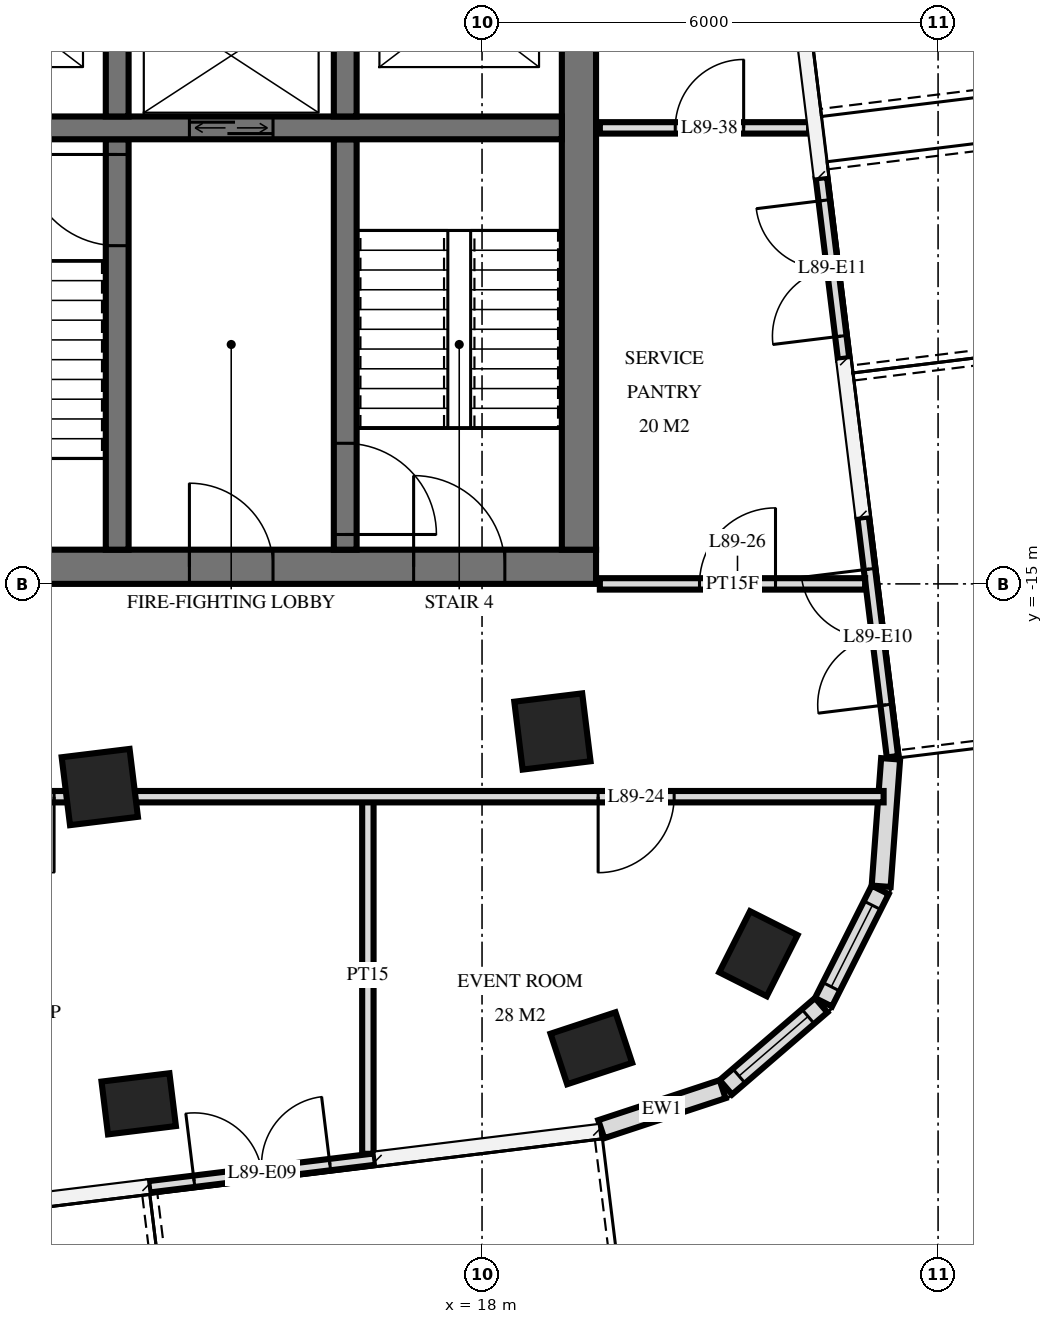
"""IFC4 building model, lengths in metres.
Left out: names, types, materials, properties, quantities, classifications, styles, units other than length and angle.
Written with IfcOpenShell. Run it as: python <this file> out.ifc"""

import sys

from ifc_helpers import new_model, si_unit, direction, frame, frame_2d, origin, origin_2d, place, context, subcontext, project, spatial, rectangle, extrude, element, fill, save


model = new_model("IFC4")
c1 = context("Model", 3, precision=1e-05, world=origin(), true_north=direction((0.0, 1.0)))
c2 = subcontext(c1, "Body", "Model", "MODEL_VIEW")
j1 = project(units=[si_unit("LENGTHUNIT", "METRE"), si_unit("PLANEANGLEUNIT", "RADIAN")], contexts=[c1])
p1 = place(None, origin())
s1 = spatial("IfcSite", under=j1, at=p1, CompositionType="ELEMENT")
p2 = place(p1, origin())
s2 = spatial("IfcBuilding", under=s1, at=p2, CompositionType="ELEMENT")
p3 = place(p2, frame((0.0, 0.0, 338.6)))
s3 = spatial("IfcBuildingStorey", under=s2, at=p3, CompositionType="ELEMENT", Elevation=338.6)
p4 = place(p3, frame((12.971, -17.673, 0.0), z_axis=(0.0, 0.0, 1.0), x_axis=(0.992546151641, 0.121869343405, 0.0)))
e1 = element("IfcColumn", 1, at=p4, inside=s3, PredefinedType="COLUMN", context=c2, shape_type="SweptSolid", body=[
    extrude(rectangle(XDim=0.9, YDim=0.9, at=origin_2d()), origin(), (0.0, 0.0, 1.0), 4.0),
])
p5 = place(p3, frame((13.483, -21.841, 0.0), z_axis=(0.0, 0.0, 1.0), x_axis=(0.992546151641, 0.121869343405, 0.0)))
e2 = element("IfcColumn", 2, at=p5, inside=s3, PredefinedType="COLUMN", context=c2, shape_type="SweptSolid", body=[
    extrude(rectangle(XDim=0.9, YDim=0.7, at=origin_2d()), origin(), (0.0, 0.0, 1.0), 4.0),
])
p6 = place(p3, frame((18.926, -16.942, 0.0), z_axis=(0.0, 0.0, 1.0), x_axis=(0.992546151641, 0.121869343405, 0.0)))
e3 = element("IfcColumn", 3, at=p6, inside=s3, PredefinedType="COLUMN", context=c2, shape_type="SweptSolid", body=[
    extrude(rectangle(XDim=0.9, YDim=0.9, at=origin_2d()), origin(), (0.0, 0.0, 1.0), 4.0),
])
for number, where, z_axis, x_axis in (
    (4, (19.438, -21.11, 0.0), (0.0, 0.0, 1.0), (0.95, 0.313, 0.0)),
    (5, (21.636, -19.866, 0.0), (0.0, 0.0, 1.0), (0.45, 0.893, 0.0)),
):
    element("IfcColumn", number, at=place(p3, frame(where, z_axis=z_axis, x_axis=x_axis)), inside=s3, PredefinedType="COLUMN", context=c2, shape_type="SweptSolid", body=[
        extrude(rectangle(XDim=0.9, YDim=0.7, at=origin_2d()), origin(), (0.0, 0.0, 1.0), 4.0),
    ])
p7 = place(p3, frame((10.0, -14.775, 0.0), z_axis=(0.0, 0.0, 1.0), x_axis=(1.0, 0.0, 0.0)))
e6 = element("IfcWall", 6, at=p7, inside=s3, PredefinedType="SHEAR", context=c2, shape_type="SweptSolid", body=[
    extrude(rectangle(XDim=9.5, YDim=0.45, at=frame_2d((4.75, 0.0))), origin(), (0.0, 0.0, 1.0), 4.0),
])
p8 = place(p7, frame((7.1, 0.0, 0.0)))
e7 = element("IfcOpeningElement", 7, at=p8, cuts=e6, PredefinedType="OPENING", context=c2, shape_type="SweptSolid", body=[
    extrude(rectangle(XDim=1.2, YDim=2.1, at=frame_2d((0.6, 1.05))), frame((0.0, 0.235, 0.0), z_axis=(0.0, -1.0, 0.0), x_axis=(1.0, 0.0, 0.0)), (0.0, 0.0, 1.0), 0.47),
])
p9 = place(p7, frame((4.15, 0.0, 0.0)))
e8 = element("IfcOpeningElement", 8, at=p9, cuts=e6, PredefinedType="OPENING", context=c2, shape_type="SweptSolid", body=[
    extrude(rectangle(XDim=1.1, YDim=2.1, at=frame_2d((0.55, 1.05))), frame((0.0, 0.235, 0.0), z_axis=(0.0, -1.0, 0.0), x_axis=(1.0, 0.0, 0.0)), (0.0, 0.0, 1.0), 0.47),
])
p10 = place(p3, frame((19.275, -14.55, 0.0), z_axis=(0.0, 0.0, 1.0), x_axis=(0.0, 1.0, 0.0)))
e9 = element("IfcWall", 9, at=p10, inside=s3, PredefinedType="SHEAR", context=c2, shape_type="SweptSolid", body=[
    extrude(rectangle(XDim=14.1, YDim=0.45, at=frame_2d((7.05, 0.0))), origin(), (0.0, 0.0, 1.0), 4.0),
])
p11 = place(p3, frame((10.35, -9.0, 0.0), z_axis=(0.0, 0.0, 1.0), x_axis=(1.0, 0.0, 0.0)))
e10 = element("IfcWall", 10, at=p11, inside=s3, PredefinedType="SHEAR", context=c2, shape_type="SweptSolid", body=[
    extrude(rectangle(XDim=8.7, YDim=0.3, at=frame_2d((4.35, 0.0))), origin(), (0.0, 0.0, 1.0), 4.0),
])
p12 = place(p11, frame((3.8, 0.0, 0.0)))
e11 = element("IfcOpeningElement", 11, at=p12, cuts=e10, PredefinedType="OPENING", context=c2, shape_type="SweptSolid", body=[
    extrude(rectangle(XDim=1.1, YDim=2.1, at=frame_2d((0.55, 1.05))), frame((0.0, 0.16, 0.0), z_axis=(0.0, -1.0, 0.0), x_axis=(1.0, 0.0, 0.0)), (0.0, 0.0, 1.0), 0.32),
])
p13 = place(p3, frame((13.2, -8.85, 0.0), z_axis=(0.0, 0.0, 1.0), x_axis=(0.0, 1.0, 0.0)))
e12 = element("IfcWall", 12, at=p13, inside=s3, PredefinedType="SHEAR", context=c2, shape_type="SweptSolid", body=[
    extrude(rectangle(XDim=2.3, YDim=0.3, at=frame_2d((1.15, 0.0))), origin(), (0.0, 0.0, 1.0), 4.0),
])
p14 = place(p3, frame((13.2, -14.55, 0.0), z_axis=(0.0, 0.0, 1.0), x_axis=(0.0, 1.0, 0.0)))
e13 = element("IfcWall", 13, at=p14, inside=s3, PredefinedType="SHEAR", context=c2, shape_type="SweptSolid", body=[
    extrude(rectangle(XDim=5.4, YDim=0.3, at=frame_2d((2.7, 0.0))), origin(), (0.0, 0.0, 1.0), 4.0),
])
p15 = place(p14, frame((4.0, 0.0, 0.0)))
e14 = element("IfcOpeningElement", 14, at=p15, cuts=e13, PredefinedType="OPENING", context=c2, shape_type="SweptSolid", body=[
    extrude(rectangle(XDim=1.2, YDim=2.1, at=frame_2d((0.6, 1.05))), frame((0.0, 0.16, 0.0), z_axis=(0.0, -1.0, 0.0), x_axis=(1.0, 0.0, 0.0)), (0.0, 0.0, 1.0), 0.32),
])
p16 = place(p3, frame((16.2, -8.85, 0.0), z_axis=(0.0, 0.0, 1.0), x_axis=(0.0, 1.0, 0.0)))
e15 = element("IfcWall", 15, at=p16, inside=s3, PredefinedType="SHEAR", context=c2, shape_type="SweptSolid", body=[
    extrude(rectangle(XDim=2.3, YDim=0.3, at=frame_2d((1.15, 0.0))), origin(), (0.0, 0.0, 1.0), 4.0),
])
p17 = place(p3, frame((16.2, -14.55, 0.0), z_axis=(0.0, 0.0, 1.0), x_axis=(0.0, 1.0, 0.0)))
e16 = element("IfcWall", 16, at=p17, inside=s3, PredefinedType="SHEAR", context=c2, shape_type="SweptSolid", body=[
    extrude(rectangle(XDim=5.4, YDim=0.3, at=frame_2d((2.7, 0.0))), origin(), (0.0, 0.0, 1.0), 4.0),
])
p18 = place(p17, frame((0.2, 0.0, 0.0)))
e17 = element("IfcOpeningElement", 17, at=p18, cuts=e16, PredefinedType="OPENING", context=c2, shape_type="SweptSolid", body=[
    extrude(rectangle(XDim=1.2, YDim=2.1, at=frame_2d((0.6, 1.05))), frame((0.0, 0.16, 0.0), z_axis=(0.0, -1.0, 0.0), x_axis=(1.0, 0.0, 0.0)), (0.0, 0.0, 1.0), 0.32),
])
p19 = place(p3, frame((13.617, -22.933, 0.0), z_axis=(0.0, 0.0, 1.0), x_axis=(0.99255088108, 0.121830819037, 0.0)))
e18 = element("IfcWall", 18, at=p19, inside=s3, PredefinedType="USERDEFINED", context=c2, shape_type="SweptSolid", body=[
    extrude(rectangle(XDim=3.0, YDim=0.15, at=frame_2d((1.5, 0.0))), origin(), (0.0, 0.0, 1.0), 3.72),
])
p20 = place(p19, frame((0.6, 0.0, 0.0)))
e19 = element("IfcOpeningElement", 19, at=p20, cuts=e18, PredefinedType="OPENING", context=c2, shape_type="SweptSolid", body=[
    extrude(rectangle(XDim=1.8, YDim=2.4, at=frame_2d((0.9, 1.2))), frame((0.0, 0.085, 0.0), z_axis=(0.0, -1.0, 0.0), x_axis=(1.0, 0.0, 0.0)), (0.0, 0.0, 1.0), 0.17),
])
p21 = place(p3, frame((19.568, -22.175, 0.0), z_axis=(0.0, 0.0, 1.0), x_axis=(0.949694735798, 0.313177120489, 0.0)))
e20 = element("IfcWall", 20, at=p21, inside=s3, PredefinedType="SOLIDWALL", context=c2, shape_type="SweptSolid", body=[
    extrude(rectangle(XDim=1.681, YDim=0.25, at=frame_2d((0.841, 0.0))), origin(), (0.0, 0.0, 1.0), 3.72),
])
p22 = place(p3, frame((21.208, -21.624, 0.0), z_axis=(0.0, 0.0, 1.0), x_axis=(0.757568315466, 0.652755886531, 0.0)))
e21 = element("IfcWall", 21, at=p22, inside=s3, PredefinedType="SOLIDWALL", context=c2, shape_type="SweptSolid", body=[
    extrude(rectangle(XDim=1.656, YDim=0.25, at=frame_2d((0.828, 0.0))), origin(), (0.0, 0.0, 1.0), 3.72),
])
p23 = place(p22, frame((0.228, 0.0, 0.9)))
e22 = element("IfcOpeningElement", 22, at=p23, cuts=e21, PredefinedType="OPENING", context=c2, shape_type="SweptSolid", body=[
    extrude(rectangle(XDim=1.2, YDim=1.5, at=frame_2d((0.6, 0.75))), frame((0.0, 0.135, 0.0), z_axis=(0.0, -1.0, 0.0), x_axis=(1.0, 0.0, 0.0)), (0.0, 0.0, 1.0), 0.27),
])
p24 = place(p3, frame((22.493, -20.505, 0.0), z_axis=(0.0, 0.0, 1.0), x_axis=(0.449982385812, 0.893037430604, 0.0)))
e23 = element("IfcWall", 23, at=p24, inside=s3, PredefinedType="SOLIDWALL", context=c2, shape_type="SweptSolid", body=[
    extrude(rectangle(XDim=1.656, YDim=0.25, at=frame_2d((0.828, 0.0))), origin(), (0.0, 0.0, 1.0), 3.72),
])
p25 = place(p24, frame((0.228, 0.0, 0.9)))
e24 = element("IfcOpeningElement", 24, at=p25, cuts=e23, PredefinedType="OPENING", context=c2, shape_type="SweptSolid", body=[
    extrude(rectangle(XDim=1.2, YDim=1.5, at=frame_2d((0.6, 0.75))), frame((0.0, 0.135, 0.0), z_axis=(0.0, -1.0, 0.0), x_axis=(1.0, 0.0, 0.0)), (0.0, 0.0, 1.0), 0.27),
])
p26 = place(p3, frame((23.251, -18.979, 0.0), z_axis=(0.0, 0.0, 1.0), x_axis=(0.074053534713, 0.997254267475, 0.0)))
e25 = element("IfcWall", 25, at=p26, inside=s3, PredefinedType="SOLIDWALL", context=c2, shape_type="SweptSolid", body=[
    extrude(rectangle(XDim=1.681, YDim=0.25, at=frame_2d((0.841, 0.0))), origin(), (0.0, 0.0, 1.0), 3.72),
])
p27 = place(p3, frame((23.4, -17.274, 0.0), z_axis=(0.0, 0.0, 1.0), x_axis=(-0.121858082248, 0.992547534273, 0.0)))
e26 = element("IfcWall", 26, at=p27, inside=s3, PredefinedType="USERDEFINED", context=c2, shape_type="SweptSolid", body=[
    extrude(rectangle(XDim=3.176, YDim=0.15, at=frame_2d((1.588, 0.0))), origin(), (0.0, 0.0, 1.0), 3.72),
])
p28 = place(p27, frame((0.688, 0.0, 0.0)))
e27 = element("IfcOpeningElement", 27, at=p28, cuts=e26, PredefinedType="OPENING", context=c2, shape_type="SweptSolid", body=[
    extrude(rectangle(XDim=1.8, YDim=2.4, at=frame_2d((0.9, 1.2))), frame((0.0, 0.085, 0.0), z_axis=(0.0, -1.0, 0.0), x_axis=(1.0, 0.0, 0.0)), (0.0, 0.0, 1.0), 0.17),
])
p29 = place(p3, frame((22.757, -12.038, 0.0), z_axis=(0.0, 0.0, 1.0), x_axis=(-0.121868445399, 0.992546261902, 0.0)))
e28 = element("IfcWall", 28, at=p29, inside=s3, PredefinedType="USERDEFINED", context=c2, shape_type="SweptSolid", body=[
    extrude(rectangle(XDim=2.4, YDim=0.15, at=frame_2d((1.2, 0.0))), origin(), (0.0, 0.0, 1.0), 3.72),
])
p30 = place(p29, frame((0.3, 0.0, 0.0)))
e29 = element("IfcOpeningElement", 29, at=p30, cuts=e28, PredefinedType="OPENING", context=c2, shape_type="SweptSolid", body=[
    extrude(rectangle(XDim=1.8, YDim=2.4, at=frame_2d((0.9, 1.2))), frame((0.0, 0.085, 0.0), z_axis=(0.0, -1.0, 0.0), x_axis=(1.0, 0.0, 0.0)), (0.0, 0.0, 1.0), 0.17),
])
p31 = place(p3, frame((16.498, -22.499, 0.0), z_axis=(0.0, 0.0, 1.0), x_axis=(0.0, 1.0, 0.0)))
e30 = element("IfcWall", 30, at=p31, inside=s3, PredefinedType="PARTITIONING", context=c2, shape_type="SweptSolid", body=[
    extrude(rectangle(XDim=4.699, YDim=0.15, at=frame_2d((2.349, 0.0))), origin(), (0.0, 0.0, 1.0), 3.72),
])
p32 = place(p3, frame((-9.461, -17.8, 0.0), z_axis=(0.0, 0.0, 1.0), x_axis=(1.0, 0.0, 0.0)))
e31 = element("IfcWall", 31, at=p32, inside=s3, PredefinedType="PARTITIONING", context=c2, shape_type="SweptSolid", body=[
    extrude(rectangle(XDim=32.744, YDim=0.15, at=frame_2d((16.372, 0.0))), origin(), (0.0, 0.0, 1.0), 3.72),
])
p33 = place(p32, frame((4.489, 0.0, 0.0)))
e32 = element("IfcOpeningElement", 32, at=p33, cuts=e31, PredefinedType="OPENING", context=c2, shape_type="SweptSolid", body=[
    extrude(rectangle(XDim=1.0, YDim=2.1, at=frame_2d((0.5, 1.05))), frame((0.0, 0.085, 0.0), z_axis=(0.0, -1.0, 0.0), x_axis=(1.0, 0.0, 0.0)), (0.0, 0.0, 1.0), 0.17),
])
p34 = place(p32, frame((13.439, 0.0, 0.0)))
e33 = element("IfcOpeningElement", 33, at=p34, cuts=e31, PredefinedType="OPENING", context=c2, shape_type="SweptSolid", body=[
    extrude(rectangle(XDim=1.0, YDim=2.1, at=frame_2d((0.5, 1.05))), frame((0.0, 0.085, 0.0), z_axis=(0.0, -1.0, 0.0), x_axis=(1.0, 0.0, 0.0)), (0.0, 0.0, 1.0), 0.17),
])
p35 = place(p32, frame((20.831, 0.0, 0.0)))
e34 = element("IfcOpeningElement", 34, at=p35, cuts=e31, PredefinedType="OPENING", context=c2, shape_type="SweptSolid", body=[
    extrude(rectangle(XDim=1.0, YDim=2.1, at=frame_2d((0.5, 1.05))), frame((0.0, 0.085, 0.0), z_axis=(0.0, -1.0, 0.0), x_axis=(1.0, 0.0, 0.0)), (0.0, 0.0, 1.0), 0.17),
])
p36 = place(p32, frame((28.989, 0.0, 0.0)))
e35 = element("IfcOpeningElement", 35, at=p36, cuts=e31, PredefinedType="OPENING", context=c2, shape_type="SweptSolid", body=[
    extrude(rectangle(XDim=1.0, YDim=2.1, at=frame_2d((0.5, 1.05))), frame((0.0, 0.085, 0.0), z_axis=(0.0, -1.0, 0.0), x_axis=(1.0, 0.0, 0.0)), (0.0, 0.0, 1.0), 0.17),
])
p37 = place(p3, frame((19.55, -15.0, 0.0), z_axis=(0.0, 0.0, 1.0), x_axis=(1.0, 0.0, 0.0)))
e36 = element("IfcWall", 36, at=p37, inside=s3, PredefinedType="PARTITIONING", context=c2, shape_type="SweptSolid", body=[
    extrude(rectangle(XDim=3.49, YDim=0.15, at=frame_2d((1.745, 0.0))), origin(), (0.0, 0.0, 1.0), 3.72),
])
p38 = place(p37, frame((1.311, 0.0, 0.0)))
e37 = element("IfcOpeningElement", 37, at=p38, cuts=e36, PredefinedType="OPENING", context=c2, shape_type="SweptSolid", body=[
    extrude(rectangle(XDim=1.0, YDim=2.1, at=frame_2d((0.5, 1.05))), frame((0.0, 0.085, 0.0), z_axis=(0.0, -1.0, 0.0), x_axis=(1.0, 0.0, 0.0)), (0.0, 0.0, 1.0), 0.17),
])
p39 = place(p3, frame((19.55, -9.0, 0.0), z_axis=(0.0, 0.0, 1.0), x_axis=(1.0, 0.0, 0.0)))
e38 = element("IfcWall", 38, at=p39, inside=s3, PredefinedType="PARTITIONING", context=c2, shape_type="SweptSolid", body=[
    extrude(rectangle(XDim=2.753, YDim=0.15, at=frame_2d((1.377, 0.0))), origin(), (0.0, 0.0, 1.0), 3.72),
])
p40 = place(p39, frame((0.992, 0.0, 0.0)))
e39 = element("IfcOpeningElement", 39, at=p40, cuts=e38, PredefinedType="OPENING", context=c2, shape_type="SweptSolid", body=[
    extrude(rectangle(XDim=0.9, YDim=2.1, at=frame_2d((0.45, 1.05))), frame((0.0, 0.085, 0.0), z_axis=(0.0, -1.0, 0.0), x_axis=(1.0, 0.0, 0.0)), (0.0, 0.0, 1.0), 0.17),
])
p41 = place(p20, origin())
e40 = element("IfcDoor", 40, at=p41, inside=s3, OperationType="DOUBLE_DOOR_SINGLE_SWING", PredefinedType="DOOR", context=c2, shape_type="SweptSolid", body=[
    extrude(rectangle(XDim=1.8, YDim=2.4, at=frame_2d((0.9, 1.2))), frame((0.0, 0.025, 0.0), z_axis=(0.0, -1.0, 0.0), x_axis=(1.0, 0.0, 0.0)), (0.0, 0.0, 1.0), 0.05),
])
fill(e19, e40)
p42 = place(p23, origin())
e41 = element("IfcWindow", 41, at=p42, inside=s3, PartitioningType="SINGLE_PANEL", PredefinedType="WINDOW", context=c2, shape_type="SweptSolid", body=[
    extrude(rectangle(XDim=1.2, YDim=1.5, at=frame_2d((0.6, 0.75))), frame((0.0, 0.03, 0.0), z_axis=(0.0, -1.0, 0.0), x_axis=(1.0, 0.0, 0.0)), (0.0, 0.0, 1.0), 0.06),
])
fill(e22, e41)
p43 = place(p25, origin())
e42 = element("IfcWindow", 42, at=p43, inside=s3, PartitioningType="SINGLE_PANEL", PredefinedType="WINDOW", context=c2, shape_type="SweptSolid", body=[
    extrude(rectangle(XDim=1.2, YDim=1.5, at=frame_2d((0.6, 0.75))), frame((0.0, 0.03, 0.0), z_axis=(0.0, -1.0, 0.0), x_axis=(1.0, 0.0, 0.0)), (0.0, 0.0, 1.0), 0.06),
])
fill(e24, e42)
p44 = place(p28, origin())
e43 = element("IfcDoor", 43, at=p44, inside=s3, OperationType="DOUBLE_DOOR_SINGLE_SWING", PredefinedType="DOOR", context=c2, shape_type="SweptSolid", body=[
    extrude(rectangle(XDim=1.8, YDim=2.4, at=frame_2d((0.9, 1.2))), frame((0.0, 0.025, 0.0), z_axis=(0.0, -1.0, 0.0), x_axis=(1.0, 0.0, 0.0)), (0.0, 0.0, 1.0), 0.05),
])
fill(e27, e43)
p45 = place(p30, origin())
e44 = element("IfcDoor", 44, at=p45, inside=s3, OperationType="DOUBLE_DOOR_SINGLE_SWING", PredefinedType="DOOR", context=c2, shape_type="SweptSolid", body=[
    extrude(rectangle(XDim=1.8, YDim=2.4, at=frame_2d((0.9, 1.2))), frame((0.0, 0.025, 0.0), z_axis=(0.0, -1.0, 0.0), x_axis=(1.0, 0.0, 0.0)), (0.0, 0.0, 1.0), 0.05),
])
fill(e29, e44)
p46 = place(p12, origin())
e45 = element("IfcDoor", 45, at=p46, inside=s3, OperationType="DOUBLE_DOOR_SLIDING", PredefinedType="USERDEFINED", context=c2, shape_type="SweptSolid", body=[
    extrude(rectangle(XDim=1.1, YDim=2.1, at=frame_2d((0.55, 1.05))), frame((0.0, 0.025, 0.0), z_axis=(0.0, -1.0, 0.0), x_axis=(1.0, 0.0, 0.0)), (0.0, 0.0, 1.0), 0.05),
])
fill(e11, e45)
p47 = place(p8, origin())
e46 = element("IfcDoor", 46, at=p47, inside=s3, OperationType="SINGLE_SWING_RIGHT", PredefinedType="DOOR", context=c2, shape_type="SweptSolid", body=[
    extrude(rectangle(XDim=1.2, YDim=2.1, at=frame_2d((0.6, 1.05))), frame((0.0, 0.025, 0.0), z_axis=(0.0, -1.0, 0.0), x_axis=(1.0, 0.0, 0.0)), (0.0, 0.0, 1.0), 0.05),
])
fill(e7, e46)
p48 = place(p9, origin())
e47 = element("IfcDoor", 47, at=p48, inside=s3, OperationType="SINGLE_SWING_RIGHT", PredefinedType="DOOR", context=c2, shape_type="SweptSolid", body=[
    extrude(rectangle(XDim=1.1, YDim=2.1, at=frame_2d((0.55, 1.05))), frame((0.0, 0.025, 0.0), z_axis=(0.0, -1.0, 0.0), x_axis=(1.0, 0.0, 0.0)), (0.0, 0.0, 1.0), 0.05),
])
fill(e8, e47)
p49 = place(p15, origin())
e48 = element("IfcDoor", 48, at=p49, inside=s3, OperationType="SINGLE_SWING_LEFT", PredefinedType="DOOR", context=c2, shape_type="SweptSolid", body=[
    extrude(rectangle(XDim=1.2, YDim=2.1, at=frame_2d((0.6, 1.05))), frame((0.0, 0.025, 0.0), z_axis=(0.0, -1.0, 0.0), x_axis=(1.0, 0.0, 0.0)), (0.0, 0.0, 1.0), 0.05),
])
fill(e14, e48)
p50 = place(p18, frame((0.6, 0.0, 0.0), z_axis=(0.0, 0.0, 1.0), x_axis=(-1.0, 0.0, 0.0)))
e49 = element("IfcDoor", 49, at=p50, inside=s3, OperationType="SINGLE_SWING_LEFT", PredefinedType="DOOR", context=c2, shape_type="SweptSolid", body=[
    extrude(rectangle(XDim=1.2, YDim=2.1, at=frame_2d((0.0, 1.05))), frame((0.0, -0.025, 0.0), z_axis=(0.0, 1.0, 0.0), x_axis=(-1.0, 0.0, 0.0)), (0.0, 0.0, 1.0), 0.05),
])
fill(e17, e49)
p51 = place(p35, frame((0.5, 0.0, 0.0), z_axis=(0.0, 0.0, 1.0), x_axis=(-1.0, 0.0, 0.0)))
e50 = element("IfcDoor", 50, at=p51, inside=s3, OperationType="SINGLE_SWING_RIGHT", PredefinedType="DOOR", context=c2, shape_type="SweptSolid", body=[
    extrude(rectangle(XDim=1.0, YDim=2.1, at=frame_2d((0.0, 1.05))), frame((0.0, -0.025, 0.0), z_axis=(0.0, 1.0, 0.0), x_axis=(-1.0, 0.0, 0.0)), (0.0, 0.0, 1.0), 0.05),
])
fill(e34, e50)
p52 = place(p36, frame((0.5, 0.0, 0.0), z_axis=(0.0, 0.0, 1.0), x_axis=(-1.0, 0.0, 0.0)))
e51 = element("IfcDoor", 51, at=p52, inside=s3, OperationType="SINGLE_SWING_LEFT", PredefinedType="DOOR", context=c2, shape_type="SweptSolid", body=[
    extrude(rectangle(XDim=1.0, YDim=2.1, at=frame_2d((0.0, 1.05))), frame((0.0, -0.025, 0.0), z_axis=(0.0, 1.0, 0.0), x_axis=(-1.0, 0.0, 0.0)), (0.0, 0.0, 1.0), 0.05),
])
fill(e35, e51)
p53 = place(p38, origin())
e52 = element("IfcDoor", 52, at=p53, inside=s3, OperationType="SINGLE_SWING_LEFT", PredefinedType="DOOR", context=c2, shape_type="SweptSolid", body=[
    extrude(rectangle(XDim=1.0, YDim=2.1, at=frame_2d((0.5, 1.05))), frame((0.0, 0.025, 0.0), z_axis=(0.0, -1.0, 0.0), x_axis=(1.0, 0.0, 0.0)), (0.0, 0.0, 1.0), 0.05),
])
fill(e37, e52)
p54 = place(p40, origin())
e53 = element("IfcDoor", 53, at=p54, inside=s3, OperationType="SINGLE_SWING_LEFT", PredefinedType="DOOR", context=c2, shape_type="SweptSolid", body=[
    extrude(rectangle(XDim=0.9, YDim=2.1, at=frame_2d((0.45, 1.05))), frame((0.0, 0.025, 0.0), z_axis=(0.0, -1.0, 0.0), x_axis=(1.0, 0.0, 0.0)), (0.0, 0.0, 1.0), 0.05),
])
fill(e39, e53)
save(model, sys.argv[1])
